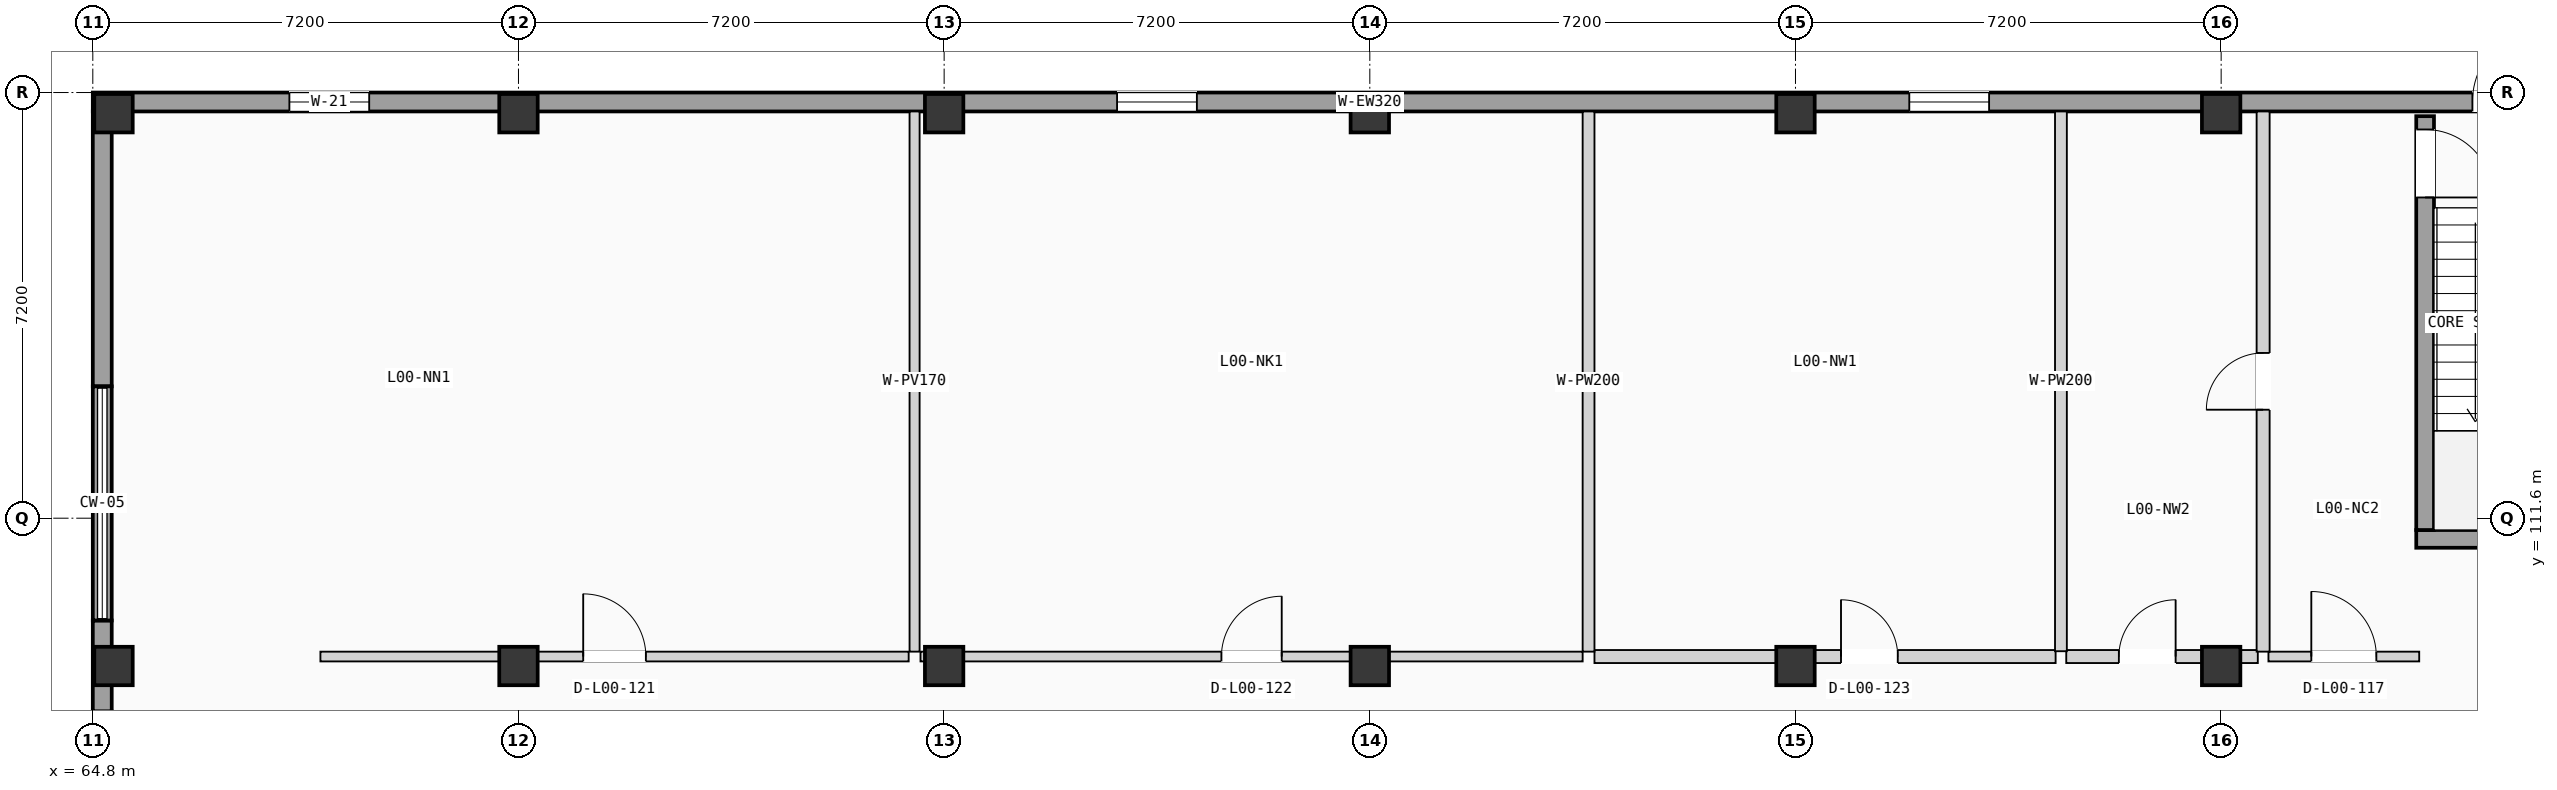
"""IFC4 building model, lengths in metres.
Left out: names, types, materials, properties, quantities, classifications, styles, units other than length and angle.
Written with IfcOpenShell. Run it as: python <this file> out.ifc"""

import sys

from ifc_helpers import new_model, si_unit, direction, frame, frame_2d, origin, origin_2d, place, context, subcontext, project, spatial, rectangle, circle, extrude, element, fill, save


model = new_model("IFC4")
c1 = context("Model", 3, precision=1e-05, world=origin(), true_north=direction((0.0, 1.0)))
c2 = subcontext(c1, "Body", "Model", "MODEL_VIEW")
j1 = project(units=[si_unit("LENGTHUNIT", "METRE"), si_unit("PLANEANGLEUNIT", "RADIAN")], contexts=[c1])
p1 = place(None, origin())
s1 = spatial("IfcSite", under=j1, at=p1, CompositionType="ELEMENT")
p2 = place(p1, origin())
s2 = spatial("IfcBuilding", under=s1, at=p2, CompositionType="ELEMENT")
p3 = place(p2, origin())
s3 = spatial("IfcBuildingStorey", under=s2, at=p3, CompositionType="ELEMENT", Elevation=0.0)
for number, where, z_axis, x_axis in (
    (1, (65.15, 109.1, 0.0), (0.0, 0.0, 1.0), (1.0, 0.0, 0.0)),
    (2, (65.15, 118.45, 0.0), (0.0, 0.0, 1.0), (1.0, 0.0, 0.0)),
    (3, (72.0, 109.1, 0.0), (0.0, 0.0, 1.0), (1.0, 0.0, 0.0)),
    (4, (72.0, 118.45, 0.0), (0.0, 0.0, 1.0), (1.0, 0.0, 0.0)),
    (5, (79.2, 109.1, 0.0), (0.0, 0.0, 1.0), (1.0, 0.0, 0.0)),
    (6, (79.2, 118.45, 0.0), (0.0, 0.0, 1.0), (1.0, 0.0, 0.0)),
    (7, (86.4, 109.1, 0.0), (0.0, 0.0, 1.0), (1.0, 0.0, 0.0)),
    (8, (86.4, 118.45, 0.0), (0.0, 0.0, 1.0), (1.0, 0.0, 0.0)),
    (9, (93.6, 109.1, 0.0), (0.0, 0.0, 1.0), (1.0, 0.0, 0.0)),
    (10, (93.6, 118.45, 0.0), (0.0, 0.0, 1.0), (1.0, 0.0, 0.0)),
    (11, (100.8, 109.1, 0.0), (0.0, 0.0, 1.0), (1.0, 0.0, 0.0)),
    (12, (100.8, 118.45, 0.0), (0.0, 0.0, 1.0), (1.0, 0.0, 0.0)),
):
    element("IfcColumn", number, at=place(p3, frame(where, z_axis=z_axis, x_axis=x_axis)), inside=s3, PredefinedType="COLUMN", context=c2, shape_type="SweptSolid", body=[
        extrude(circle(Radius=0.325, at=origin_2d()), origin(), (0.0, 0.0, 1.0), 4.9),
    ])
p4 = place(p3, frame((64.8, 118.64, 0.0), z_axis=(0.0, 0.0, 1.0), x_axis=(1.0, 0.0, 0.0)))
e13 = element("IfcWall", 13, at=p4, inside=s3, PredefinedType="SOLIDWALL", context=c2, shape_type="SweptSolid", body=[
    extrude(rectangle(XDim=43.2, YDim=0.32, at=frame_2d((21.6, 0.0))), origin(), (0.0, 0.0, 1.0), 4.63),
])
p5 = place(p4, frame((40.25, 0.0, 0.0)))
e14 = element("IfcOpeningElement", 14, at=p5, cuts=e13, PredefinedType="OPENING", context=c2, shape_type="SweptSolid", body=[
    extrude(rectangle(XDim=1.3, YDim=2.2, at=frame_2d((0.65, 1.1))), frame((0.0, 0.17, 0.0), z_axis=(0.0, -1.0, 0.0), x_axis=(1.0, 0.0, 0.0)), (0.0, 0.0, 1.0), 0.34),
])
p6 = place(p4, frame((3.325, 0.0, 0.8)))
e15 = element("IfcOpeningElement", 15, at=p6, cuts=e13, PredefinedType="OPENING", context=c2, shape_type="SweptSolid", body=[
    extrude(rectangle(XDim=1.35, YDim=1.2, at=frame_2d((0.675, 0.6))), frame((0.0, 0.17, 0.0), z_axis=(0.0, -1.0, 0.0), x_axis=(1.0, 0.0, 0.0)), (0.0, 0.0, 1.0), 0.34),
])
p7 = place(p4, frame((17.325, 0.0, 0.8)))
e16 = element("IfcOpeningElement", 16, at=p7, cuts=e13, PredefinedType="OPENING", context=c2, shape_type="SweptSolid", body=[
    extrude(rectangle(XDim=1.35, YDim=1.2, at=frame_2d((0.675, 0.6))), frame((0.0, 0.17, 0.0), z_axis=(0.0, -1.0, 0.0), x_axis=(1.0, 0.0, 0.0)), (0.0, 0.0, 1.0), 0.34),
])
p8 = place(p4, frame((30.725, 0.0, 0.8)))
e17 = element("IfcOpeningElement", 17, at=p8, cuts=e13, PredefinedType="OPENING", context=c2, shape_type="SweptSolid", body=[
    extrude(rectangle(XDim=1.35, YDim=1.2, at=frame_2d((0.675, 0.6))), frame((0.0, 0.17, 0.0), z_axis=(0.0, -1.0, 0.0), x_axis=(1.0, 0.0, 0.0)), (0.0, 0.0, 1.0), 0.34),
])
p9 = place(p3, frame((64.96, 108.33, 0.0), z_axis=(0.0, 0.0, 1.0), x_axis=(0.0, 1.0, 0.0)))
e18 = element("IfcWall", 18, at=p9, inside=s3, PredefinedType="SOLIDWALL", context=c2, shape_type="SweptSolid", body=[
    extrude(rectangle(XDim=1.54, YDim=0.32, at=frame_2d((0.77, 0.0))), origin(), (0.0, 0.0, 1.0), 4.63),
])
p10 = place(p3, frame((64.96, 113.83, 0.0), z_axis=(0.0, 0.0, 1.0), x_axis=(0.0, 1.0, 0.0)))
e19 = element("IfcWall", 19, at=p10, inside=s3, PredefinedType="SOLIDWALL", context=c2, shape_type="SweptSolid", body=[
    extrude(rectangle(XDim=4.65, YDim=0.32, at=frame_2d((2.325, 0.0))), origin(), (0.0, 0.0, 1.0), 4.63),
])
p11 = place(p3, frame((64.96, 109.87, 0.0), z_axis=(0.0, 0.0, 1.0), x_axis=(0.0, 1.0, 0.0)))
e20 = element("IfcWall", 20, at=p11, inside=s3, PredefinedType="SOLIDWALL", context=c2, shape_type="SweptSolid", body=[
    extrude(rectangle(XDim=3.96, YDim=0.32, at=frame_2d((1.98, 0.0))), origin(), (0.0, 0.0, 1.0), 1.11),
])
p12 = place(p3, frame((104.1, 111.25, 0.0), z_axis=(0.0, 0.0, 1.0), x_axis=(1.0, 0.0, 0.0)))
e21 = element("IfcWall", 21, at=p12, inside=s3, PredefinedType="SHEAR", context=c2, shape_type="SweptSolid", body=[
    extrude(rectangle(XDim=3.6, YDim=0.3, at=frame_2d((1.8, 0.0))), origin(), (0.0, 0.0, 1.0), 4.63),
])
p13 = place(p3, frame((104.25, 111.4, 0.0), z_axis=(0.0, 0.0, 1.0), x_axis=(0.0, 1.0, 0.0)))
e22 = element("IfcWall", 22, at=p13, inside=s3, PredefinedType="SHEAR", context=c2, shape_type="SweptSolid", body=[
    extrude(rectangle(XDim=7.0, YDim=0.3, at=frame_2d((3.5, 0.0))), origin(), (0.0, 0.0, 1.0), 4.63),
])
p14 = place(p13, frame((5.625, 0.0, 0.0)))
e23 = element("IfcOpeningElement", 23, at=p14, cuts=e22, PredefinedType="OPENING", context=c2, shape_type="SweptSolid", body=[
    extrude(rectangle(XDim=1.15, YDim=2.12, at=frame_2d((0.575, 1.06))), frame((0.0, 0.16, 0.0), z_axis=(0.0, -1.0, 0.0), x_axis=(1.0, 0.0, 0.0)), (0.0, 0.0, 1.0), 0.32),
])
p15 = place(p3, frame((101.6, 109.26, 0.0), z_axis=(0.0, 0.0, 1.0), x_axis=(1.0, 0.0, 0.0)))
e24 = element("IfcWall", 24, at=p15, inside=s3, PredefinedType="PARTITIONING", context=c2, shape_type="SweptSolid", body=[
    extrude(rectangle(XDim=2.55, YDim=0.165, at=frame_2d((1.275, 0.0))), origin(), (0.0, 0.0, 1.0), 3.84),
])
p16 = place(p15, frame((0.725, 0.0, 0.0)))
e25 = element("IfcOpeningElement", 25, at=p16, cuts=e24, PredefinedType="OPENING", context=c2, shape_type="SweptSolid", body=[
    extrude(rectangle(XDim=1.1, YDim=2.12, at=frame_2d((0.55, 1.06))), frame((0.0, 0.093, 0.0), z_axis=(0.0, -1.0, 0.0), x_axis=(1.0, 0.0, 0.0)), (0.0, 0.0, 1.0), 0.185),
])
p17 = place(p3, frame((68.65, 109.26, 0.0), z_axis=(0.0, 0.0, 1.0), x_axis=(1.0, 0.0, 0.0)))
e26 = element("IfcWall", 26, at=p17, inside=s3, PredefinedType="PARTITIONING", context=c2, shape_type="SweptSolid", body=[
    extrude(rectangle(XDim=9.95, YDim=0.165, at=frame_2d((4.975, 0.0))), origin(), (0.0, 0.0, 1.0), 3.84),
])
p18 = place(p17, frame((4.445, 0.0, 0.0)))
e27 = element("IfcOpeningElement", 27, at=p18, cuts=e26, PredefinedType="OPENING", context=c2, shape_type="SweptSolid", body=[
    extrude(rectangle(XDim=1.06, YDim=2.14, at=frame_2d((0.53, 1.07))), frame((0.0, 0.093, 0.0), z_axis=(0.0, -1.0, 0.0), x_axis=(1.0, 0.0, 0.0)), (0.0, 0.0, 1.0), 0.185),
])
p19 = place(p3, frame((78.8, 109.26, 0.0), z_axis=(0.0, 0.0, 1.0), x_axis=(1.0, 0.0, 0.0)))
e28 = element("IfcWall", 28, at=p19, inside=s3, PredefinedType="PARTITIONING", context=c2, shape_type="SweptSolid", body=[
    extrude(rectangle(XDim=11.2, YDim=0.165, at=frame_2d((5.6, 0.0))), origin(), (0.0, 0.0, 1.0), 3.84),
])
p20 = place(p19, frame((5.09, 0.0, 0.0)))
e29 = element("IfcOpeningElement", 29, at=p20, cuts=e28, PredefinedType="OPENING", context=c2, shape_type="SweptSolid", body=[
    extrude(rectangle(XDim=1.02, YDim=2.16, at=frame_2d((0.51, 1.08))), frame((0.0, 0.093, 0.0), z_axis=(0.0, -1.0, 0.0), x_axis=(1.0, 0.0, 0.0)), (0.0, 0.0, 1.0), 0.185),
])
p21 = place(p3, frame((90.2, 109.26, 0.0), z_axis=(0.0, 0.0, 1.0), x_axis=(1.0, 0.0, 0.0)))
e30 = element("IfcWall", 30, at=p21, inside=s3, PredefinedType="PLUMBINGWALL", context=c2, shape_type="SweptSolid", body=[
    extrude(rectangle(XDim=7.8, YDim=0.22, at=frame_2d((3.9, 0.0))), origin(), (0.0, 0.0, 1.0), 3.84),
])
p22 = place(p21, frame((4.17, 0.0, 0.0)))
e31 = element("IfcOpeningElement", 31, at=p22, cuts=e30, PredefinedType="OPENING", context=c2, shape_type="SweptSolid", body=[
    extrude(rectangle(XDim=0.96, YDim=2.05, at=frame_2d((0.48, 1.025))), frame((0.0, 0.12, 0.0), z_axis=(0.0, -1.0, 0.0), x_axis=(1.0, 0.0, 0.0)), (0.0, 0.0, 1.0), 0.24),
])
p23 = place(p3, frame((98.18, 109.26, 0.0), z_axis=(0.0, 0.0, 1.0), x_axis=(1.0, 0.0, 0.0)))
e32 = element("IfcWall", 32, at=p23, inside=s3, PredefinedType="PLUMBINGWALL", context=c2, shape_type="SweptSolid", body=[
    extrude(rectangle(XDim=3.24, YDim=0.22, at=frame_2d((1.62, 0.0))), origin(), (0.0, 0.0, 1.0), 3.84),
])
p24 = place(p23, frame((0.89, 0.0, 0.0)))
e33 = element("IfcOpeningElement", 33, at=p24, cuts=e32, PredefinedType="OPENING", context=c2, shape_type="SweptSolid", body=[
    extrude(rectangle(XDim=0.96, YDim=2.05, at=frame_2d((0.48, 1.025))), frame((0.0, 0.12, 0.0), z_axis=(0.0, -1.0, 0.0), x_axis=(1.0, 0.0, 0.0)), (0.0, 0.0, 1.0), 0.24),
])
p25 = place(p3, frame((101.51, 109.343, 0.0), z_axis=(0.0, 0.0, 1.0), x_axis=(0.0, 1.0, 0.0)))
e34 = element("IfcWall", 34, at=p25, inside=s3, PredefinedType="PLUMBINGWALL", context=c2, shape_type="SweptSolid", body=[
    extrude(rectangle(XDim=9.137, YDim=0.22, at=frame_2d((4.568, 0.0))), origin(), (0.0, 0.0, 1.0), 3.84),
])
p26 = place(p25, frame((4.092, 0.0, 0.0)))
e35 = element("IfcOpeningElement", 35, at=p26, cuts=e34, PredefinedType="OPENING", context=c2, shape_type="SweptSolid", body=[
    extrude(rectangle(XDim=0.96, YDim=2.05, at=frame_2d((0.48, 1.025))), frame((0.0, 0.12, 0.0), z_axis=(0.0, -1.0, 0.0), x_axis=(1.0, 0.0, 0.0)), (0.0, 0.0, 1.0), 0.24),
])
p27 = place(p3, frame((78.7, 109.343, 0.0), z_axis=(0.0, 0.0, 1.0), x_axis=(0.0, 1.0, 0.0)))
e36 = element("IfcWall", 36, at=p27, inside=s3, PredefinedType="PARTITIONING", context=c2, shape_type="SweptSolid", body=[
    extrude(rectangle(XDim=9.137, YDim=0.17, at=frame_2d((4.568, 0.0))), origin(), (0.0, 0.0, 1.0), 3.84),
])
p28 = place(p3, frame((90.1, 109.343, 0.0), z_axis=(0.0, 0.0, 1.0), x_axis=(0.0, 1.0, 0.0)))
e37 = element("IfcWall", 37, at=p28, inside=s3, PredefinedType="PLUMBINGWALL", context=c2, shape_type="SweptSolid", body=[
    extrude(rectangle(XDim=9.137, YDim=0.2, at=frame_2d((4.568, 0.0))), origin(), (0.0, 0.0, 1.0), 3.84),
])
p29 = place(p3, frame((98.09, 109.35, 0.0), z_axis=(0.0, 0.0, 1.0), x_axis=(0.0, 1.0, 0.0)))
e38 = element("IfcWall", 38, at=p29, inside=s3, PredefinedType="PLUMBINGWALL", context=c2, shape_type="SweptSolid", body=[
    extrude(rectangle(XDim=9.13, YDim=0.2, at=frame_2d((4.565, 0.0))), origin(), (0.0, 0.0, 1.0), 3.84),
])
p30 = place(p5, origin())
e39 = element("IfcDoor", 39, at=p30, inside=s3, OperationType="SINGLE_SWING_RIGHT", PredefinedType="DOOR", context=c2, shape_type="SweptSolid", body=[
    extrude(rectangle(XDim=1.3, YDim=2.2, at=frame_2d((0.65, 1.1))), frame((0.0, 0.025, 0.0), z_axis=(0.0, -1.0, 0.0), x_axis=(1.0, 0.0, 0.0)), (0.0, 0.0, 1.0), 0.05),
])
fill(e14, e39)
p31 = place(p6, origin())
e40 = element("IfcWindow", 40, at=p31, inside=s3, PartitioningType="SINGLE_PANEL", PredefinedType="WINDOW", context=c2, shape_type="SweptSolid", body=[
    extrude(rectangle(XDim=1.35, YDim=1.2, at=frame_2d((0.675, 0.6))), frame((0.0, 0.03, 0.0), z_axis=(0.0, -1.0, 0.0), x_axis=(1.0, 0.0, 0.0)), (0.0, 0.0, 1.0), 0.06),
])
fill(e15, e40)
p32 = place(p7, origin())
e41 = element("IfcWindow", 41, at=p32, inside=s3, PartitioningType="SINGLE_PANEL", PredefinedType="WINDOW", context=c2, shape_type="SweptSolid", body=[
    extrude(rectangle(XDim=1.35, YDim=1.2, at=frame_2d((0.675, 0.6))), frame((0.0, 0.03, 0.0), z_axis=(0.0, -1.0, 0.0), x_axis=(1.0, 0.0, 0.0)), (0.0, 0.0, 1.0), 0.06),
])
fill(e16, e41)
p33 = place(p8, origin())
e42 = element("IfcWindow", 42, at=p33, inside=s3, PartitioningType="SINGLE_PANEL", PredefinedType="WINDOW", context=c2, shape_type="SweptSolid", body=[
    extrude(rectangle(XDim=1.35, YDim=1.2, at=frame_2d((0.675, 0.6))), frame((0.0, 0.03, 0.0), z_axis=(0.0, -1.0, 0.0), x_axis=(1.0, 0.0, 0.0)), (0.0, 0.0, 1.0), 0.06),
])
fill(e17, e42)
p34 = place(p14, frame((1.15, 0.0, 0.0), z_axis=(0.0, 0.0, 1.0), x_axis=(-1.0, 0.0, 0.0)))
e43 = element("IfcDoor", 43, at=p34, inside=s3, OperationType="SINGLE_SWING_LEFT", PredefinedType="DOOR", context=c2, shape_type="SweptSolid", body=[
    extrude(rectangle(XDim=1.15, YDim=2.12, at=frame_2d((0.575, 1.06))), frame((0.0, 0.025, 0.0), z_axis=(0.0, -1.0, 0.0), x_axis=(1.0, 0.0, 0.0)), (0.0, 0.0, 1.0), 0.05),
])
fill(e23, e43)
p35 = place(p16, origin())
e44 = element("IfcDoor", 44, at=p35, inside=s3, OperationType="SINGLE_SWING_LEFT", PredefinedType="DOOR", context=c2, shape_type="SweptSolid", body=[
    extrude(rectangle(XDim=1.1, YDim=2.12, at=frame_2d((0.55, 1.06))), frame((0.0, 0.025, 0.0), z_axis=(0.0, -1.0, 0.0), x_axis=(1.0, 0.0, 0.0)), (0.0, 0.0, 1.0), 0.05),
])
fill(e25, e44)
p36 = place(p18, origin())
e45 = element("IfcDoor", 45, at=p36, inside=s3, OperationType="SINGLE_SWING_LEFT", PredefinedType="DOOR", context=c2, shape_type="SweptSolid", body=[
    extrude(rectangle(XDim=1.06, YDim=2.14, at=frame_2d((0.53, 1.07))), frame((0.0, 0.025, 0.0), z_axis=(0.0, -1.0, 0.0), x_axis=(1.0, 0.0, 0.0)), (0.0, 0.0, 1.0), 0.05),
])
fill(e27, e45)
p37 = place(p20, origin())
e46 = element("IfcDoor", 46, at=p37, inside=s3, OperationType="SINGLE_SWING_RIGHT", PredefinedType="DOOR", context=c2, shape_type="SweptSolid", body=[
    extrude(rectangle(XDim=1.02, YDim=2.16, at=frame_2d((0.51, 1.08))), frame((0.0, 0.025, 0.0), z_axis=(0.0, -1.0, 0.0), x_axis=(1.0, 0.0, 0.0)), (0.0, 0.0, 1.0), 0.05),
])
fill(e29, e46)
p38 = place(p22, origin())
e47 = element("IfcDoor", 47, at=p38, inside=s3, OperationType="SINGLE_SWING_LEFT", PredefinedType="DOOR", context=c2, shape_type="SweptSolid", body=[
    extrude(rectangle(XDim=0.96, YDim=2.05, at=frame_2d((0.48, 1.025))), frame((0.0, 0.025, 0.0), z_axis=(0.0, -1.0, 0.0), x_axis=(1.0, 0.0, 0.0)), (0.0, 0.0, 1.0), 0.05),
])
fill(e31, e47)
p39 = place(p24, origin())
e48 = element("IfcDoor", 48, at=p39, inside=s3, OperationType="SINGLE_SWING_RIGHT", PredefinedType="DOOR", context=c2, shape_type="SweptSolid", body=[
    extrude(rectangle(XDim=0.96, YDim=2.05, at=frame_2d((0.48, 1.025))), frame((0.0, 0.025, 0.0), z_axis=(0.0, -1.0, 0.0), x_axis=(1.0, 0.0, 0.0)), (0.0, 0.0, 1.0), 0.05),
])
fill(e33, e48)
p40 = place(p26, origin())
e49 = element("IfcDoor", 49, at=p40, inside=s3, OperationType="SINGLE_SWING_LEFT", PredefinedType="DOOR", context=c2, shape_type="SweptSolid", body=[
    extrude(rectangle(XDim=0.96, YDim=2.05, at=frame_2d((0.48, 1.025))), frame((0.0, 0.025, 0.0), z_axis=(0.0, -1.0, 0.0), x_axis=(1.0, 0.0, 0.0)), (0.0, 0.0, 1.0), 0.05),
])
fill(e35, e49)
save(model, sys.argv[1])
